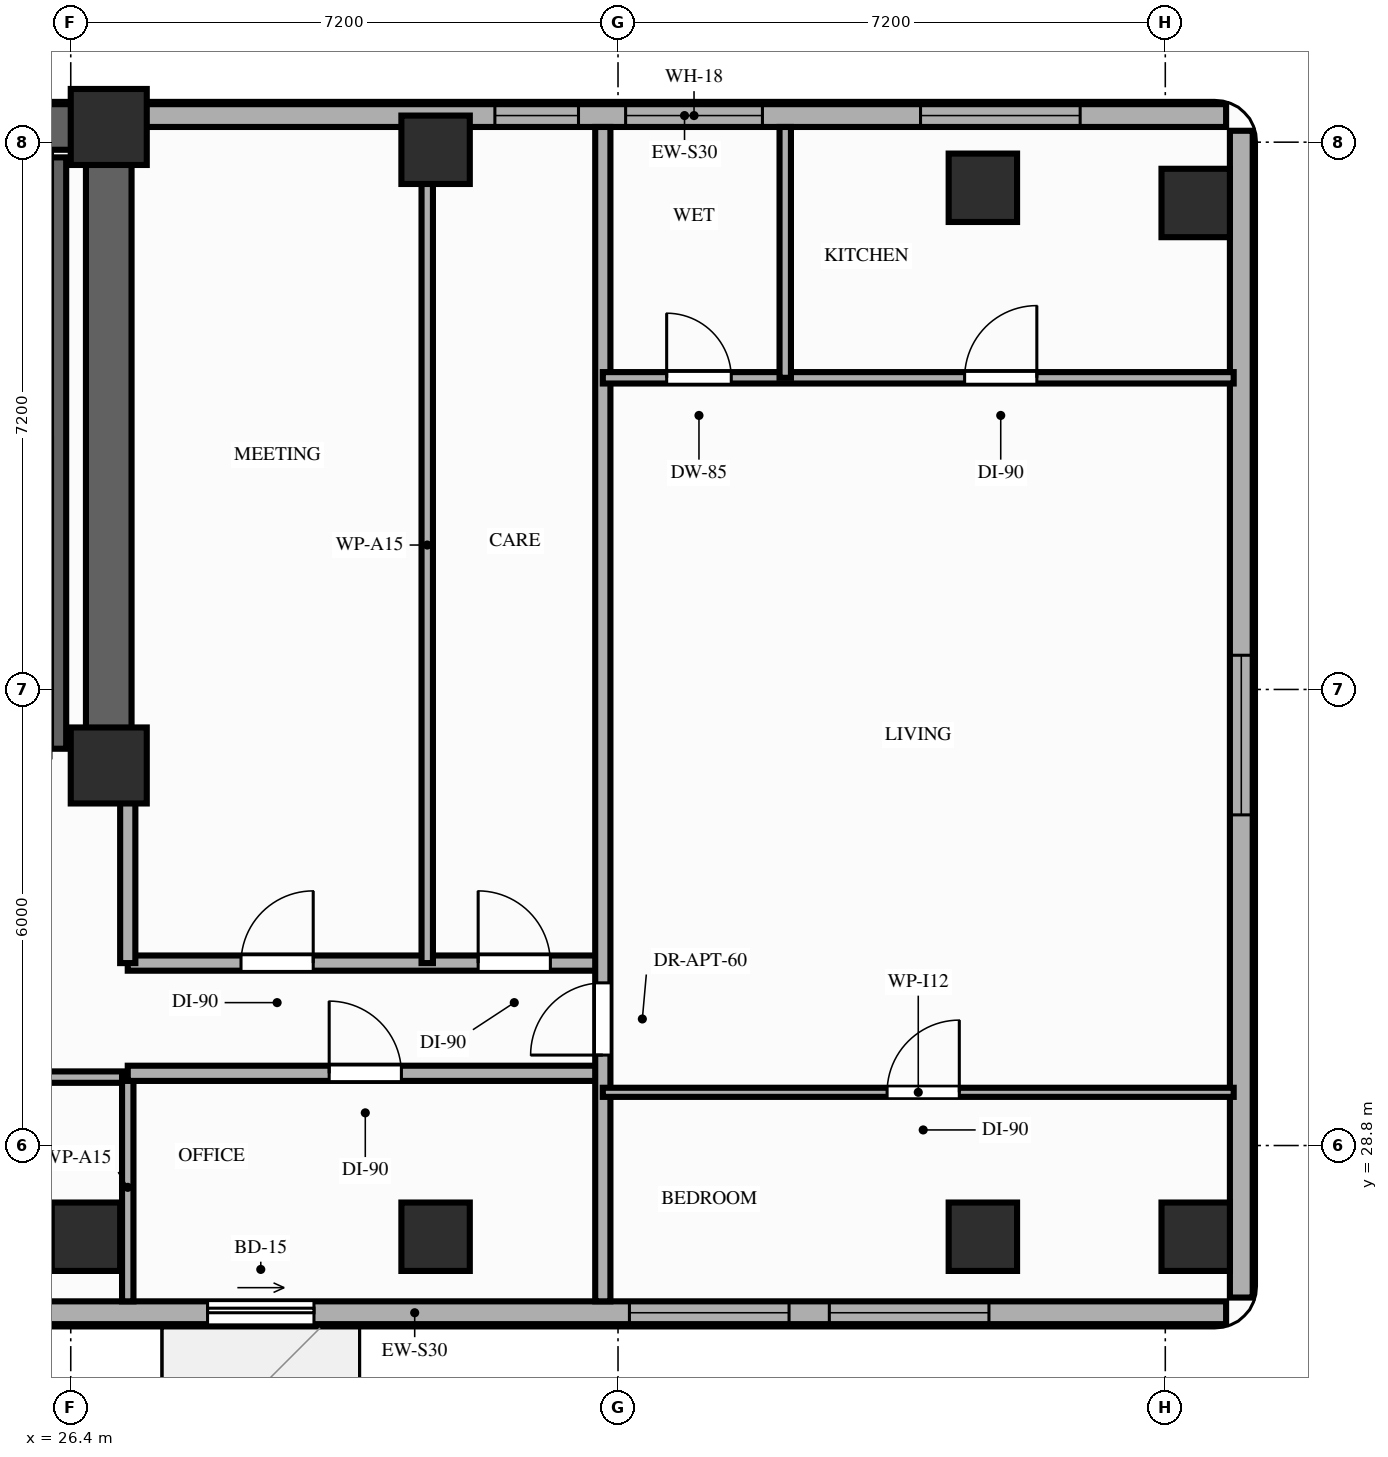
"""IFC4 building model, lengths in metres.
Left out: names, types, materials, properties, quantities, classifications, styles, units other than length and angle.
Written with IfcOpenShell. Run it as: python <this file> out.ifc"""

import sys

from ifc_helpers import new_model, si_unit, direction, frame, frame_2d, origin, origin_2d, place, context, subcontext, project, spatial, rectangle, extrude, element, fill, save


model = new_model("IFC4")
c1 = context("Model", 3, precision=1e-05, world=origin(), true_north=direction((0.0, 1.0)))
c2 = subcontext(c1, "Body", "Model", "MODEL_VIEW")
j1 = project(units=[si_unit("LENGTHUNIT", "METRE"), si_unit("PLANEANGLEUNIT", "RADIAN")], contexts=[c1])
p1 = place(None, origin())
s1 = spatial("IfcSite", under=j1, at=p1, CompositionType="ELEMENT")
p2 = place(p1, origin())
s2 = spatial("IfcBuilding", under=s1, at=p2, CompositionType="ELEMENT")
p3 = place(p2, frame((0.0, 0.0, 185.6)))
s3 = spatial("IfcBuildingStorey", under=s2, at=p3, CompositionType="ELEMENT", Elevation=185.6)
for number, where, z_axis, x_axis in (
    (1, (26.9, 33.8, 0.0), (0.0, 0.0, 1.0), (1.0, 0.0, 0.0)),
    (2, (26.9, 42.2, 0.0), (0.0, 0.0, 1.0), (1.0, 0.0, 0.0)),
):
    element("IfcColumn", number, at=place(p3, frame(where, z_axis=z_axis, x_axis=x_axis)), inside=s3, PredefinedType="COLUMN", context=c2, shape_type="SweptSolid", body=[
        extrude(rectangle(XDim=1.0, YDim=1.0, at=origin_2d()), origin(), (0.0, 0.0, 1.0), 3.2),
    ])
for number, where, z_axis, x_axis in (
    (3, (26.6, 27.6, 0.0), (0.0, 0.0, 1.0), (1.0, 0.0, 0.0)),
    (4, (31.2, 27.6, 0.0), (0.0, 0.0, 1.0), (1.0, 0.0, 0.0)),
    (5, (31.2, 41.9, 0.0), (0.0, 0.0, 1.0), (1.0, 0.0, 0.0)),
    (6, (38.4, 27.6, 0.0), (0.0, 0.0, 1.0), (1.0, 0.0, 0.0)),
    (7, (38.4, 41.4, 0.0), (0.0, 0.0, 1.0), (1.0, 0.0, 0.0)),
    (8, (41.2, 27.6, 0.0), (0.0, 0.0, 1.0), (1.0, 0.0, 0.0)),
    (9, (41.2, 41.2, 0.0), (0.0, 0.0, 1.0), (1.0, 0.0, 0.0)),
):
    element("IfcColumn", number, at=place(p3, frame(where, z_axis=z_axis, x_axis=x_axis)), inside=s3, PredefinedType="COLUMN", context=c2, shape_type="SweptSolid", body=[
        extrude(rectangle(XDim=0.9, YDim=0.9, at=origin_2d()), origin(), (0.0, 0.0, 1.0), 3.2),
    ])
p4 = place(p3, frame((41.6, 42.35, 0.0), z_axis=(0.0, 0.0, 1.0), x_axis=(-1.0, 0.0, 0.0)))
e10 = element("IfcWall", 10, at=p4, inside=s3, PredefinedType="STANDARD", context=c2, shape_type="SweptSolid", body=[
    extrude(rectangle(XDim=14.25, YDim=0.3, at=frame_2d((7.125, 0.0))), origin(), (0.0, 0.0, 1.0), 2.45),
])
p5 = place(p4, frame((6.1, 0.0, 0.85)))
e11 = element("IfcOpeningElement", 11, at=p5, cuts=e10, PredefinedType="OPENING", context=c2, shape_type="SweptSolid", body=[
    extrude(rectangle(XDim=1.8, YDim=1.35, at=frame_2d((0.9, 0.675))), frame((0.0, 0.16, 0.0), z_axis=(0.0, -1.0, 0.0), x_axis=(1.0, 0.0, 0.0)), (0.0, 0.0, 1.0), 0.32),
])
p6 = place(p4, frame((1.92, 0.0, 0.85)))
e12 = element("IfcOpeningElement", 12, at=p6, cuts=e10, PredefinedType="OPENING", context=c2, shape_type="SweptSolid", body=[
    extrude(rectangle(XDim=2.1, YDim=1.35, at=frame_2d((1.05, 0.675))), frame((0.0, 0.16, 0.0), z_axis=(0.0, -1.0, 0.0), x_axis=(1.0, 0.0, 0.0)), (0.0, 0.0, 1.0), 0.32),
])
p7 = place(p4, frame((8.52, 0.0, 0.85)))
e13 = element("IfcOpeningElement", 13, at=p7, cuts=e10, PredefinedType="OPENING", context=c2, shape_type="SweptSolid", body=[
    extrude(rectangle(XDim=1.1, YDim=1.35, at=frame_2d((0.55, 0.675))), frame((0.0, 0.16, 0.0), z_axis=(0.0, -1.0, 0.0), x_axis=(1.0, 0.0, 0.0)), (0.0, 0.0, 1.0), 0.32),
])
p8 = place(p3, frame((20.25, 26.6, 0.0), z_axis=(0.0, 0.0, 1.0), x_axis=(1.0, 0.0, 0.0)))
e14 = element("IfcWall", 14, at=p8, inside=s3, PredefinedType="STANDARD", context=c2, shape_type="SweptSolid", body=[
    extrude(rectangle(XDim=21.35, YDim=0.3, at=frame_2d((10.675, 0.0))), origin(), (0.0, 0.0, 1.0), 2.71),
])
p9 = place(p8, frame((7.95, 0.0, 0.0)))
e15 = element("IfcOpeningElement", 15, at=p9, cuts=e14, PredefinedType="OPENING", context=c2, shape_type="SweptSolid", body=[
    extrude(rectangle(XDim=1.4, YDim=2.1, at=frame_2d((0.7, 1.05))), frame((0.0, 0.16, 0.0), z_axis=(0.0, -1.0, 0.0), x_axis=(1.0, 0.0, 0.0)), (0.0, 0.0, 1.0), 0.32),
])
p10 = place(p8, frame((16.13, 0.0, 0.85)))
e16 = element("IfcOpeningElement", 16, at=p10, cuts=e14, PredefinedType="OPENING", context=c2, shape_type="SweptSolid", body=[
    extrude(rectangle(XDim=2.1, YDim=1.61, at=frame_2d((1.05, 0.805))), frame((0.0, 0.16, 0.0), z_axis=(0.0, -1.0, 0.0), x_axis=(1.0, 0.0, 0.0)), (0.0, 0.0, 1.0), 0.32),
])
p11 = place(p8, frame((2.1, 0.0, 0.85)))
e17 = element("IfcOpeningElement", 17, at=p11, cuts=e14, PredefinedType="OPENING", context=c2, shape_type="SweptSolid", body=[
    extrude(rectangle(XDim=2.1, YDim=1.61, at=frame_2d((1.05, 0.805))), frame((0.0, 0.16, 0.0), z_axis=(0.0, -1.0, 0.0), x_axis=(1.0, 0.0, 0.0)), (0.0, 0.0, 1.0), 0.32),
])
p12 = place(p8, frame((13.5, 0.0, 0.85)))
e18 = element("IfcOpeningElement", 18, at=p12, cuts=e14, PredefinedType="OPENING", context=c2, shape_type="SweptSolid", body=[
    extrude(rectangle(XDim=2.1, YDim=1.61, at=frame_2d((1.05, 0.805))), frame((0.0, 0.16, 0.0), z_axis=(0.0, -1.0, 0.0), x_axis=(1.0, 0.0, 0.0)), (0.0, 0.0, 1.0), 0.32),
])
p13 = place(p3, frame((41.8, 26.8, 0.0), z_axis=(0.0, 0.0, 1.0), x_axis=(0.0, 1.0, 0.0)))
e19 = element("IfcWall", 19, at=p13, inside=s3, PredefinedType="STANDARD", context=c2, shape_type="SweptSolid", body=[
    extrude(rectangle(XDim=15.35, YDim=0.3, at=frame_2d((7.675, 0.0))), origin(), (0.0, 0.0, 1.0), 3.02),
])
p14 = place(p13, frame((6.35, 0.0, 0.85)))
e20 = element("IfcOpeningElement", 20, at=p14, cuts=e19, PredefinedType="OPENING", context=c2, shape_type="SweptSolid", body=[
    extrude(rectangle(XDim=2.1, YDim=1.8, at=frame_2d((1.05, 0.9))), frame((0.0, 0.16, 0.0), z_axis=(0.0, -1.0, 0.0), x_axis=(1.0, 0.0, 0.0)), (0.0, 0.0, 1.0), 0.32),
])
p15 = place(p3, frame((6.45, 42.2, 0.0), z_axis=(0.0, 0.0, 1.0), x_axis=(1.0, 0.0, 0.0)))
e21 = element("IfcWall", 21, at=p15, inside=s3, PredefinedType="SHEAR", context=c2, shape_type="SweptSolid", body=[
    extrude(rectangle(XDim=20.45, YDim=0.6, at=frame_2d((10.225, 0.0))), origin(), (0.0, 0.0, 1.0), 3.02),
])
p16 = place(p3, frame((26.9, 33.8, 0.0), z_axis=(0.0, 0.0, 1.0), x_axis=(0.0, 1.0, 0.0)))
e22 = element("IfcWall", 22, at=p16, inside=s3, PredefinedType="SHEAR", context=c2, shape_type="SweptSolid", body=[
    extrude(rectangle(XDim=7.95, YDim=0.6, at=frame_2d((3.975, 0.0))), origin(), (0.0, 0.0, 1.0), 3.02),
])
p17 = place(p3, frame((26.24, 34.02, 0.0), z_axis=(0.0, 0.0, 1.0), x_axis=(0.0, 1.0, 0.0)))
e23 = element("IfcWall", 23, at=p17, inside=s3, PredefinedType="SHEAR", context=c2, shape_type="SweptSolid", body=[
    extrude(rectangle(XDim=7.78, YDim=0.2, at=frame_2d((3.89, 0.0))), origin(), (0.0, 0.0, 1.0), 3.02),
])
p18 = place(p3, frame((20.45, 29.7, 0.0), z_axis=(0.0, 0.0, 1.0), x_axis=(1.0, 0.0, 0.0)))
e24 = element("IfcWall", 24, at=p18, inside=s3, PredefinedType="PARTITIONING", context=c2, shape_type="SweptSolid", body=[
    extrude(rectangle(XDim=6.7, YDim=0.15, at=frame_2d((3.35, 0.0))), origin(), (0.0, 0.0, 1.0), 3.02),
])
p19 = place(p18, frame((2.8, 0.0, 0.0)))
e25 = element("IfcOpeningElement", 25, at=p19, cuts=e24, PredefinedType="OPENING", context=c2, shape_type="SweptSolid", body=[
    extrude(rectangle(XDim=0.95, YDim=2.15, at=frame_2d((0.475, 1.075))), frame((0.0, 0.085, 0.0), z_axis=(0.0, -1.0, 0.0), x_axis=(1.0, 0.0, 0.0)), (0.0, 0.0, 1.0), 0.17),
])
p20 = place(p3, frame((27.15, 26.75, 0.0), z_axis=(0.0, 0.0, 1.0), x_axis=(0.0, 1.0, 0.0)))
e26 = element("IfcWall", 26, at=p20, inside=s3, PredefinedType="PARTITIONING", context=c2, shape_type="SweptSolid", body=[
    extrude(rectangle(XDim=3.0, YDim=0.15, at=frame_2d((1.5, 0.0))), origin(), (0.0, 0.0, 1.0), 2.45),
])
p21 = place(p3, frame((27.15, 29.75, 0.0), z_axis=(0.0, 0.0, 1.0), x_axis=(1.0, 0.0, 0.0)))
e27 = element("IfcWall", 27, at=p21, inside=s3, PredefinedType="PARTITIONING", context=c2, shape_type="SweptSolid", body=[
    extrude(rectangle(XDim=6.25, YDim=0.2, at=frame_2d((3.125, 0.0))), origin(), (0.0, 0.0, 1.0), 2.45),
])
p22 = place(p21, frame((2.65, 0.0, 0.0)))
e28 = element("IfcOpeningElement", 28, at=p22, cuts=e27, PredefinedType="OPENING", context=c2, shape_type="SweptSolid", body=[
    extrude(rectangle(XDim=0.95, YDim=2.15, at=frame_2d((0.475, 1.075))), frame((0.0, 0.11, 0.0), z_axis=(0.0, -1.0, 0.0), x_axis=(1.0, 0.0, 0.0)), (0.0, 0.0, 1.0), 0.22),
])
p23 = place(p3, frame((27.15, 31.2, 0.0), z_axis=(0.0, 0.0, 1.0), x_axis=(1.0, 0.0, 0.0)))
e29 = element("IfcWall", 29, at=p23, inside=s3, PredefinedType="PARTITIONING", context=c2, shape_type="SweptSolid", body=[
    extrude(rectangle(XDim=6.25, YDim=0.2, at=frame_2d((3.125, 0.0))), origin(), (0.0, 0.0, 1.0), 2.45),
])
p24 = place(p23, frame((1.49, 0.0, 0.0)))
e30 = element("IfcOpeningElement", 30, at=p24, cuts=e29, PredefinedType="OPENING", context=c2, shape_type="SweptSolid", body=[
    extrude(rectangle(XDim=0.95, YDim=2.15, at=frame_2d((0.475, 1.075))), frame((0.0, 0.11, 0.0), z_axis=(0.0, -1.0, 0.0), x_axis=(1.0, 0.0, 0.0)), (0.0, 0.0, 1.0), 0.22),
])
p25 = place(p23, frame((4.61, 0.0, 0.0)))
e31 = element("IfcOpeningElement", 31, at=p25, cuts=e29, PredefinedType="OPENING", context=c2, shape_type="SweptSolid", body=[
    extrude(rectangle(XDim=0.95, YDim=2.15, at=frame_2d((0.475, 1.075))), frame((0.0, 0.11, 0.0), z_axis=(0.0, -1.0, 0.0), x_axis=(1.0, 0.0, 0.0)), (0.0, 0.0, 1.0), 0.22),
])
p26 = place(p3, frame((27.15, 31.2, 0.0), z_axis=(0.0, 0.0, 1.0), x_axis=(0.0, 1.0, 0.0)))
e32 = element("IfcWall", 32, at=p26, inside=s3, PredefinedType="PARTITIONING", context=c2, shape_type="SweptSolid", body=[
    extrude(rectangle(XDim=2.48, YDim=0.2, at=frame_2d((1.24, 0.0))), origin(), (0.0, 0.0, 1.0), 2.45),
])
p27 = place(p3, frame((33.4, 26.75, 0.0), z_axis=(0.0, 0.0, 1.0), x_axis=(0.0, 1.0, 0.0)))
e33 = element("IfcWall", 33, at=p27, inside=s3, PredefinedType="PARTITIONING", context=c2, shape_type="SweptSolid", body=[
    extrude(rectangle(XDim=15.45, YDim=0.2, at=frame_2d((7.725, 0.0))), origin(), (0.0, 0.0, 1.0), 2.45),
])
p28 = place(p27, frame((3.24, 0.0, 0.0)))
e34 = element("IfcOpeningElement", 34, at=p28, cuts=e33, PredefinedType="OPENING", context=c2, shape_type="SweptSolid", body=[
    extrude(rectangle(XDim=0.95, YDim=2.15, at=frame_2d((0.475, 1.075))), frame((0.0, 0.11, 0.0), z_axis=(0.0, -1.0, 0.0), x_axis=(1.0, 0.0, 0.0)), (0.0, 0.0, 1.0), 0.22),
])
p29 = place(p3, frame((33.4, 29.5, 0.0), z_axis=(0.0, 0.0, 1.0), x_axis=(1.0, 0.0, 0.0)))
e35 = element("IfcWall", 35, at=p29, inside=s3, PredefinedType="PARTITIONING", context=c2, shape_type="SweptSolid", body=[
    extrude(rectangle(XDim=8.3, YDim=0.12, at=frame_2d((4.15, 0.0))), origin(), (0.0, 0.0, 1.0), 2.45),
])
p30 = place(p29, frame((3.74, 0.0, 0.0)))
e36 = element("IfcOpeningElement", 36, at=p30, cuts=e35, PredefinedType="OPENING", context=c2, shape_type="SweptSolid", body=[
    extrude(rectangle(XDim=0.95, YDim=2.15, at=frame_2d((0.475, 1.075))), frame((0.0, 0.07, 0.0), z_axis=(0.0, -1.0, 0.0), x_axis=(1.0, 0.0, 0.0)), (0.0, 0.0, 1.0), 0.14),
])
p31 = place(p3, frame((33.4, 38.9, 0.0), z_axis=(0.0, 0.0, 1.0), x_axis=(1.0, 0.0, 0.0)))
e37 = element("IfcWall", 37, at=p31, inside=s3, PredefinedType="PARTITIONING", context=c2, shape_type="SweptSolid", body=[
    extrude(rectangle(XDim=8.3, YDim=0.15, at=frame_2d((4.15, 0.0))), origin(), (0.0, 0.0, 1.0), 2.45),
])
p32 = place(p31, frame((0.84, 0.0, 0.0)))
e38 = element("IfcOpeningElement", 38, at=p32, cuts=e37, PredefinedType="OPENING", context=c2, shape_type="SweptSolid", body=[
    extrude(rectangle(XDim=0.85, YDim=2.1, at=frame_2d((0.425, 1.05))), frame((0.0, 0.085, 0.0), z_axis=(0.0, -1.0, 0.0), x_axis=(1.0, 0.0, 0.0)), (0.0, 0.0, 1.0), 0.17),
])
p33 = place(p31, frame((4.76, 0.0, 0.0)))
e39 = element("IfcOpeningElement", 39, at=p33, cuts=e37, PredefinedType="OPENING", context=c2, shape_type="SweptSolid", body=[
    extrude(rectangle(XDim=0.95, YDim=2.15, at=frame_2d((0.475, 1.075))), frame((0.0, 0.085, 0.0), z_axis=(0.0, -1.0, 0.0), x_axis=(1.0, 0.0, 0.0)), (0.0, 0.0, 1.0), 0.17),
])
p34 = place(p3, frame((35.8, 38.9, 0.0), z_axis=(0.0, 0.0, 1.0), x_axis=(0.0, 1.0, 0.0)))
e40 = element("IfcWall", 40, at=p34, inside=s3, PredefinedType="PARTITIONING", context=c2, shape_type="SweptSolid", body=[
    extrude(rectangle(XDim=3.3, YDim=0.15, at=frame_2d((1.65, 0.0))), origin(), (0.0, 0.0, 1.0), 2.45),
])
p35 = place(p3, frame((31.09, 31.2, 0.0), z_axis=(0.0, 0.0, 1.0), x_axis=(0.0, 1.0, 0.0)))
e41 = element("IfcWall", 41, at=p35, inside=s3, PredefinedType="PARTITIONING", context=c2, shape_type="SweptSolid", body=[
    extrude(rectangle(XDim=11.0, YDim=0.15, at=frame_2d((5.5, 0.0))), origin(), (0.0, 0.0, 1.0), 2.45),
])
p36 = place(p9, origin())
e42 = element("IfcDoor", 42, at=p36, inside=s3, OperationType="SLIDING_TO_RIGHT", PredefinedType="DOOR", context=c2, shape_type="SweptSolid", body=[
    extrude(rectangle(XDim=1.4, YDim=2.1, at=frame_2d((0.7, 1.05))), frame((0.0, 0.025, 0.0), z_axis=(0.0, -1.0, 0.0), x_axis=(1.0, 0.0, 0.0)), (0.0, 0.0, 1.0), 0.05),
])
fill(e15, e42)
p37 = place(p14, origin())
e43 = element("IfcWindow", 43, at=p37, inside=s3, PartitioningType="SINGLE_PANEL", PredefinedType="WINDOW", context=c2, shape_type="SweptSolid", body=[
    extrude(rectangle(XDim=2.1, YDim=1.8, at=frame_2d((1.05, 0.9))), frame((0.0, 0.03, 0.0), z_axis=(0.0, -1.0, 0.0), x_axis=(1.0, 0.0, 0.0)), (0.0, 0.0, 1.0), 0.06),
])
fill(e20, e43)
p38 = place(p10, origin())
e44 = element("IfcWindow", 44, at=p38, inside=s3, PartitioningType="SINGLE_PANEL", PredefinedType="WINDOW", context=c2, shape_type="SweptSolid", body=[
    extrude(rectangle(XDim=2.1, YDim=1.61, at=frame_2d((1.05, 0.805))), frame((0.0, 0.03, 0.0), z_axis=(0.0, -1.0, 0.0), x_axis=(1.0, 0.0, 0.0)), (0.0, 0.0, 1.0), 0.06),
])
fill(e16, e44)
p39 = place(p5, origin())
e45 = element("IfcWindow", 45, at=p39, inside=s3, PartitioningType="SINGLE_PANEL", PredefinedType="WINDOW", context=c2, shape_type="SweptSolid", body=[
    extrude(rectangle(XDim=1.8, YDim=1.35, at=frame_2d((0.9, 0.675))), frame((0.0, 0.03, 0.0), z_axis=(0.0, -1.0, 0.0), x_axis=(1.0, 0.0, 0.0)), (0.0, 0.0, 1.0), 0.06),
])
fill(e11, e45)
p40 = place(p6, origin())
e46 = element("IfcWindow", 46, at=p40, inside=s3, PartitioningType="SINGLE_PANEL", PredefinedType="WINDOW", context=c2, shape_type="SweptSolid", body=[
    extrude(rectangle(XDim=2.1, YDim=1.35, at=frame_2d((1.05, 0.675))), frame((0.0, 0.03, 0.0), z_axis=(0.0, -1.0, 0.0), x_axis=(1.0, 0.0, 0.0)), (0.0, 0.0, 1.0), 0.06),
])
fill(e12, e46)
p41 = place(p7, origin())
e47 = element("IfcWindow", 47, at=p41, inside=s3, PartitioningType="SINGLE_PANEL", PredefinedType="WINDOW", context=c2, shape_type="SweptSolid", body=[
    extrude(rectangle(XDim=1.1, YDim=1.35, at=frame_2d((0.55, 0.675))), frame((0.0, 0.03, 0.0), z_axis=(0.0, -1.0, 0.0), x_axis=(1.0, 0.0, 0.0)), (0.0, 0.0, 1.0), 0.06),
])
fill(e13, e47)
p42 = place(p12, origin())
e48 = element("IfcWindow", 48, at=p42, inside=s3, PartitioningType="SINGLE_PANEL", PredefinedType="WINDOW", context=c2, shape_type="SweptSolid", body=[
    extrude(rectangle(XDim=2.1, YDim=1.61, at=frame_2d((1.05, 0.805))), frame((0.0, 0.03, 0.0), z_axis=(0.0, -1.0, 0.0), x_axis=(1.0, 0.0, 0.0)), (0.0, 0.0, 1.0), 0.06),
])
fill(e18, e48)
p43 = place(p28, origin())
e49 = element("IfcDoor", 49, at=p43, inside=s3, OperationType="SINGLE_SWING_LEFT", PredefinedType="DOOR", context=c2, shape_type="SweptSolid", body=[
    extrude(rectangle(XDim=0.95, YDim=2.15, at=frame_2d((0.475, 1.075))), frame((0.0, 0.025, 0.0), z_axis=(0.0, -1.0, 0.0), x_axis=(1.0, 0.0, 0.0)), (0.0, 0.0, 1.0), 0.05),
])
fill(e34, e49)
p44 = place(p30, origin())
e50 = element("IfcDoor", 50, at=p44, inside=s3, OperationType="SINGLE_SWING_RIGHT", PredefinedType="DOOR", context=c2, shape_type="SweptSolid", body=[
    extrude(rectangle(XDim=0.95, YDim=2.15, at=frame_2d((0.475, 1.075))), frame((0.0, 0.025, 0.0), z_axis=(0.0, -1.0, 0.0), x_axis=(1.0, 0.0, 0.0)), (0.0, 0.0, 1.0), 0.05),
])
fill(e36, e50)
p45 = place(p32, origin())
e51 = element("IfcDoor", 51, at=p45, inside=s3, OperationType="SINGLE_SWING_LEFT", PredefinedType="DOOR", context=c2, shape_type="SweptSolid", body=[
    extrude(rectangle(XDim=0.85, YDim=2.1, at=frame_2d((0.425, 1.05))), frame((0.0, 0.025, 0.0), z_axis=(0.0, -1.0, 0.0), x_axis=(1.0, 0.0, 0.0)), (0.0, 0.0, 1.0), 0.05),
])
fill(e38, e51)
p46 = place(p33, origin())
e52 = element("IfcDoor", 52, at=p46, inside=s3, OperationType="SINGLE_SWING_RIGHT", PredefinedType="DOOR", context=c2, shape_type="SweptSolid", body=[
    extrude(rectangle(XDim=0.95, YDim=2.15, at=frame_2d((0.475, 1.075))), frame((0.0, 0.025, 0.0), z_axis=(0.0, -1.0, 0.0), x_axis=(1.0, 0.0, 0.0)), (0.0, 0.0, 1.0), 0.05),
])
fill(e39, e52)
p47 = place(p22, origin())
e53 = element("IfcDoor", 53, at=p47, inside=s3, OperationType="SINGLE_SWING_LEFT", PredefinedType="DOOR", context=c2, shape_type="SweptSolid", body=[
    extrude(rectangle(XDim=0.95, YDim=2.15, at=frame_2d((0.475, 1.075))), frame((0.0, 0.025, 0.0), z_axis=(0.0, -1.0, 0.0), x_axis=(1.0, 0.0, 0.0)), (0.0, 0.0, 1.0), 0.05),
])
fill(e28, e53)
p48 = place(p24, origin())
e54 = element("IfcDoor", 54, at=p48, inside=s3, OperationType="SINGLE_SWING_RIGHT", PredefinedType="DOOR", context=c2, shape_type="SweptSolid", body=[
    extrude(rectangle(XDim=0.95, YDim=2.15, at=frame_2d((0.475, 1.075))), frame((0.0, 0.025, 0.0), z_axis=(0.0, -1.0, 0.0), x_axis=(1.0, 0.0, 0.0)), (0.0, 0.0, 1.0), 0.05),
])
fill(e30, e54)
p49 = place(p25, origin())
e55 = element("IfcDoor", 55, at=p49, inside=s3, OperationType="SINGLE_SWING_LEFT", PredefinedType="DOOR", context=c2, shape_type="SweptSolid", body=[
    extrude(rectangle(XDim=0.95, YDim=2.15, at=frame_2d((0.475, 1.075))), frame((0.0, 0.025, 0.0), z_axis=(0.0, -1.0, 0.0), x_axis=(1.0, 0.0, 0.0)), (0.0, 0.0, 1.0), 0.05),
])
fill(e31, e55)
save(model, sys.argv[1])
